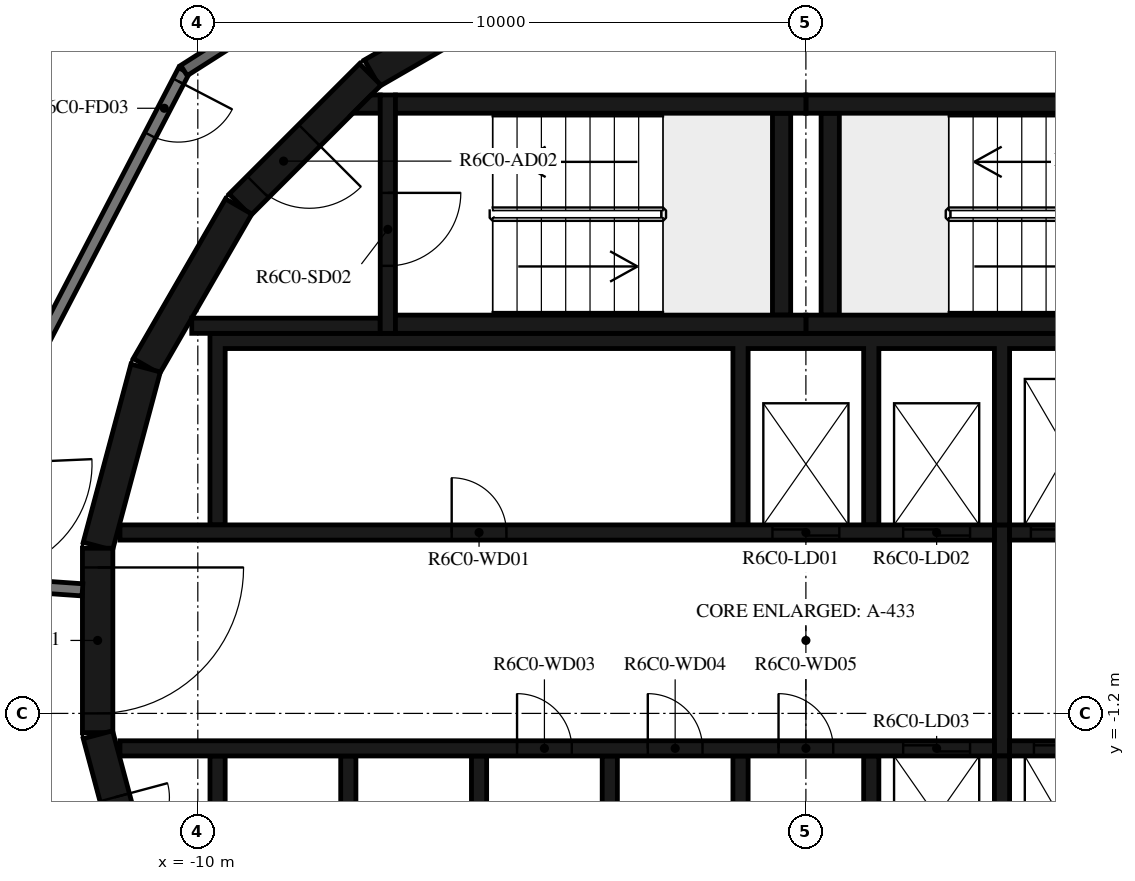
"""IFC4 building model, lengths in metres.
Left out: names, types, materials, properties, quantities, classifications, styles, units other than length and angle.
Written with IfcOpenShell. Run it as: python <this file> out.ifc"""

import sys

from ifc_helpers import new_model, si_unit, direction, frame, frame_2d, origin, place, context, subcontext, project, spatial, polyline, rectangle, outline, extrude, element, fill, save


model = new_model("IFC4")
c1 = context("Model", 3, precision=1e-05, world=origin(), true_north=direction((0.0, 1.0)))
c2 = subcontext(c1, "Body", "Model", "MODEL_VIEW")
j1 = project(units=[si_unit("LENGTHUNIT", "METRE"), si_unit("PLANEANGLEUNIT", "RADIAN")], contexts=[c1])
p1 = place(None, origin())
s1 = spatial("IfcSite", under=j1, at=p1, CompositionType="ELEMENT")
p2 = place(p1, origin())
s2 = spatial("IfcBuilding", under=s1, at=p2, CompositionType="ELEMENT")
p3 = place(p2, frame((0.0, 0.0, 247.7)))
s3 = spatial("IfcBuildingStorey", under=s2, at=p3, CompositionType="ELEMENT", Elevation=247.7)
p4 = place(p3, frame((-4.51, 10.845, 0.0), z_axis=(0.0, 0.0, 1.0), x_axis=(-0.865975092491, -0.500087131594, 0.0)))
e1 = element("IfcWall", 1, at=p4, inside=s3, PredefinedType="SHEAR", context=c2, shape_type="SweptSolid", body=[
    extrude(rectangle(XDim=3.033, YDim=0.5, at=frame_2d((1.516, 0.0))), origin(), (0.0, 0.0, 1.0), 3.12),
])
p5 = place(p3, frame((-7.164, 9.308, 0.0), z_axis=(0.0, 0.0, 1.0), x_axis=(-0.707106781187, -0.707106781187, 0.0)))
e2 = element("IfcWall", 2, at=p5, inside=s3, PredefinedType="SHEAR", context=c2, shape_type="SweptSolid", body=[
    extrude(rectangle(XDim=3.032, YDim=0.5, at=frame_2d((1.516, 0.0))), origin(), (0.0, 0.0, 1.0), 3.12),
])
p6 = place(p5, frame((1.416, 0.0, 0.0)))
e3 = element("IfcOpeningElement", 3, at=p6, cuts=e2, PredefinedType="OPENING", context=c2, shape_type="SweptSolid", body=[
    extrude(rectangle(XDim=1.2, YDim=2.1, at=frame_2d((0.6, 1.05))), frame((0.0, 0.26, 0.0), z_axis=(0.0, -1.0, 0.0), x_axis=(1.0, 0.0, 0.0)), (0.0, 0.0, 1.0), 0.52),
])
for number, where, z_axis, x_axis in (
    (4, (-9.329, 7.137, 0.0), (0.0, 0.0, 1.0), (-0.5, -0.866, 0.0)),
    (5, (-10.858, 4.479, 0.0), (0.0, 0.0, 1.0), (-0.259, -0.966, 0.0)),
):
    element("IfcWall", number, at=place(p3, frame(where, z_axis=z_axis, x_axis=x_axis)), inside=s3, PredefinedType="SHEAR", context=c2, shape_type="SweptSolid", body=[
        extrude(rectangle(XDim=3.033, YDim=0.5, at=frame_2d((1.516, 0.0))), origin(), (0.0, 0.0, 1.0), 3.12),
    ])
p7 = place(p3, frame((-11.647, 1.516, 0.0), z_axis=(0.0, 0.0, 1.0), x_axis=(0.0, -1.0, 0.0)))
e6 = element("IfcWall", 6, at=p7, inside=s3, PredefinedType="SHEAR", context=c2, shape_type="SweptSolid", body=[
    extrude(rectangle(XDim=3.033, YDim=0.5, at=frame_2d((1.516, 0.0))), origin(), (0.0, 0.0, 1.0), 3.12),
])
p8 = place(p7, frame((0.316, 0.0, 0.0)))
e7 = element("IfcOpeningElement", 7, at=p8, cuts=e6, PredefinedType="OPENING", context=c2, shape_type="SweptSolid", body=[
    extrude(rectangle(XDim=2.4, YDim=2.1, at=frame_2d((1.2, 1.05))), frame((0.0, 0.26, 0.0), z_axis=(0.0, -1.0, 0.0), x_axis=(1.0, 0.0, 0.0)), (0.0, 0.0, 1.0), 0.52),
])
p9 = place(p3, frame((-11.643, -1.55, 0.0), z_axis=(0.0, 0.0, 1.0), x_axis=(0.258734743916, -0.965948410781, 0.0)))
e8 = element("IfcWall", 8, at=p9, inside=s3, PredefinedType="SHEAR", context=c2, shape_type="SweptSolid", body=[
    extrude(rectangle(XDim=3.033, YDim=0.5, at=frame_2d((1.516, 0.0))), origin(), (0.0, 0.0, 1.0), 3.12),
])
p10 = place(p9, frame((1.066, 0.0, 0.0)))
e9 = element("IfcOpeningElement", 9, at=p10, cuts=e8, PredefinedType="OPENING", context=c2, shape_type="SweptSolid", body=[
    extrude(rectangle(XDim=0.9, YDim=2.1, at=frame_2d((0.45, 1.05))), frame((0.0, 0.26, 0.0), z_axis=(0.0, -1.0, 0.0), x_axis=(1.0, 0.0, 0.0)), (0.0, 0.0, 1.0), 0.52),
])
for number, where, z_axis, x_axis in (
    (10, (0.0, 5.2, 0.0), (0.0, 0.0, 1.0), (1.0, 0.0, 0.0)),
    (11, (0.0, 8.82, 0.0), (0.0, 0.0, 1.0), (1.0, 0.0, 0.0)),
):
    element("IfcWall", number, at=place(p3, frame(where, z_axis=z_axis, x_axis=x_axis)), inside=s3, PredefinedType="SHEAR", context=c2, shape_type="SweptSolid", body=[
        extrude(rectangle(XDim=6.75, YDim=0.3, at=frame_2d((3.375, 0.0))), origin(), (0.0, 0.0, 1.0), 3.12),
    ])
p11 = place(p3, frame((0.4, 5.35, 0.0), z_axis=(0.0, 0.0, 1.0), x_axis=(0.0, 1.0, 0.0)))
e12 = element("IfcWall", 12, at=p11, inside=s3, PredefinedType="SHEAR", context=c2, shape_type="SweptSolid", body=[
    extrude(rectangle(XDim=3.32, YDim=0.3, at=frame_2d((1.66, 0.0))), origin(), (0.0, 0.0, 1.0), 3.12),
])
for number, where, z_axis, x_axis in (
    (13, (-6.75, 5.2, 0.0), (0.0, 0.0, 1.0), (1.0, 0.0, 0.0)),
    (14, (-6.75, 8.82, 0.0), (0.0, 0.0, 1.0), (1.0, 0.0, 0.0)),
):
    element("IfcWall", number, at=place(p3, frame(where, z_axis=z_axis, x_axis=x_axis)), inside=s3, PredefinedType="SHEAR", context=c2, shape_type="SweptSolid", body=[
        extrude(rectangle(XDim=6.75, YDim=0.3, at=frame_2d((3.375, 0.0))), origin(), (0.0, 0.0, 1.0), 3.12),
    ])
p12 = place(p3, frame((-0.4, 5.35, 0.0), z_axis=(0.0, 0.0, 1.0), x_axis=(0.0, 1.0, 0.0)))
e15 = element("IfcWall", 15, at=p12, inside=s3, PredefinedType="SHEAR", context=c2, shape_type="SweptSolid", body=[
    extrude(rectangle(XDim=3.32, YDim=0.3, at=frame_2d((1.66, 0.0))), origin(), (0.0, 0.0, 1.0), 3.12),
])
p13 = place(p3, frame((-6.875, 8.97, 0.0), z_axis=(0.0, 0.0, 1.0), x_axis=(0.0, -1.0, 0.0)))
e16 = element("IfcWall", 16, at=p13, inside=s3, PredefinedType="SHEAR", context=c2, shape_type="SweptSolid", body=[
    extrude(rectangle(XDim=3.92, YDim=0.25, at=frame_2d((1.96, 0.0))), origin(), (0.0, 0.0, 1.0), 3.12),
])
p14 = place(p13, frame((1.61, 0.0, 0.0)))
e17 = element("IfcOpeningElement", 17, at=p14, cuts=e16, PredefinedType="OPENING", context=c2, shape_type="SweptSolid", body=[
    extrude(rectangle(XDim=1.2, YDim=2.1, at=frame_2d((0.6, 1.05))), frame((0.0, 0.135, 0.0), z_axis=(0.0, -1.0, 0.0), x_axis=(1.0, 0.0, 0.0)), (0.0, 0.0, 1.0), 0.27),
])
p15 = place(p3, frame((-7.0, 5.175, 0.0), z_axis=(0.0, 0.0, 1.0), x_axis=(-1.0, 0.0, 0.0)))
e18 = element("IfcWall", 18, at=p15, inside=s3, PredefinedType="SHEAR", context=c2, shape_type="SweptSolid", body=[
    extrude(rectangle(XDim=3.1, YDim=0.25, at=frame_2d((1.55, 0.0))), origin(), (0.0, 0.0, 1.0), 3.12),
])
p16 = place(p3, origin())
e19 = element("IfcWall", 19, at=p16, inside=s3, PredefinedType="SHEAR", context=c2, shape_type="SweptSolid", body=[
    extrude(outline(polyline([(-7.148, 8.97), (-7.0, 8.97), (-7.0, 8.67), (-7.448, 8.67), (-7.148, 8.97)])), origin(), (0.0, 0.0, 1.0), 3.12),
])
p17 = place(p3, origin())
e20 = element("IfcWall", 20, at=p17, inside=s3, PredefinedType="SHEAR", context=c2, shape_type="SweptSolid", body=[
    extrude(outline(polyline([(-9.55, 4.8), (-1.2, 4.8), (-1.2, 1.9), (-0.95, 1.9), (-0.95, 4.8), (0.95, 4.8), (0.95, 1.9), (1.2, 1.9), (1.2, 4.8), (3.1, 4.8), (3.1, 1.9), (3.35, 1.9), (3.35, 4.8), (5.25, 4.8), (5.25, 1.9), (5.5, 1.9), (5.5, 4.8), (7.4, 4.8), (7.4, 1.9), (7.65, 1.9), (7.65, 4.8), (9.55, 4.8), (9.55, 1.9), (9.8, 1.9), (9.8, 4.8), (9.8, 5.05), (-9.8, 5.05), (-9.8, 4.8), (-9.8, 1.9), (-9.55, 1.9), (-9.55, 4.8)])), origin(), (0.0, 0.0, 1.0), 3.12),
])
p18 = place(p3, origin())
e21 = element("IfcWall", 21, at=p18, inside=s3, PredefinedType="SHEAR", context=c2, shape_type="SweptSolid", body=[
    extrude(outline(polyline([(9.8, -5.05), (9.8, -4.8), (9.8, -1.9), (9.55, -1.9), (9.55, -4.8), (7.65, -4.8), (7.65, -1.9), (7.4, -1.9), (7.4, -4.8), (5.5, -4.8), (5.5, -1.9), (5.25, -1.9), (5.25, -4.8), (3.35, -4.8), (3.35, -1.9), (3.1, -1.9), (3.1, -4.8), (1.2, -4.8), (1.2, -1.9), (0.95, -1.9), (0.95, -4.8), (-0.95, -4.8), (-0.95, -1.9), (-1.2, -1.9), (-1.2, -4.8), (-3.1, -4.8), (-3.1, -1.9), (-3.35, -1.9), (-3.35, -4.8), (-5.25, -4.8), (-5.25, -1.9), (-5.5, -1.9), (-5.5, -4.8), (-7.4, -4.8), (-7.4, -1.9), (-7.65, -1.9), (-7.65, -4.8), (-9.55, -4.8), (-9.55, -1.9), (-9.8, -1.9), (-9.8, -4.8), (-9.8, -5.05), (9.8, -5.05)])), origin(), (0.0, 0.0, 1.0), 3.12),
])
p19 = place(p3, frame((-11.28, 1.775, 0.0), z_axis=(0.0, 0.0, 1.0), x_axis=(1.0, 0.0, 0.0)))
e22 = element("IfcWall", 22, at=p19, inside=s3, PredefinedType="SHEAR", context=c2, shape_type="SweptSolid", body=[
    extrude(rectangle(XDim=14.38, YDim=0.25, at=frame_2d((7.19, 0.0))), origin(), (0.0, 0.0, 1.0), 3.12),
])
p20 = place(p19, frame((10.73, 0.0, 0.0)))
e23 = element("IfcOpeningElement", 23, at=p20, cuts=e22, PredefinedType="OPENING", context=c2, shape_type="SweptSolid", body=[
    extrude(rectangle(XDim=1.1, YDim=2.1, at=frame_2d((0.55, 1.05))), frame((0.0, 0.135, 0.0), z_axis=(0.0, -1.0, 0.0), x_axis=(1.0, 0.0, 0.0)), (0.0, 0.0, 1.0), 0.27),
])
p21 = place(p19, frame((12.88, 0.0, 0.0)))
e24 = element("IfcOpeningElement", 24, at=p21, cuts=e22, PredefinedType="OPENING", context=c2, shape_type="SweptSolid", body=[
    extrude(rectangle(XDim=1.1, YDim=2.1, at=frame_2d((0.55, 1.05))), frame((0.0, 0.135, 0.0), z_axis=(0.0, -1.0, 0.0), x_axis=(1.0, 0.0, 0.0)), (0.0, 0.0, 1.0), 0.27),
])
p22 = place(p19, frame((5.455, 0.0, 0.0)))
e25 = element("IfcOpeningElement", 25, at=p22, cuts=e22, PredefinedType="OPENING", context=c2, shape_type="SweptSolid", body=[
    extrude(rectangle(XDim=0.9, YDim=2.1, at=frame_2d((0.45, 1.05))), frame((0.0, 0.135, 0.0), z_axis=(0.0, -1.0, 0.0), x_axis=(1.0, 0.0, 0.0)), (0.0, 0.0, 1.0), 0.27),
])
p23 = place(p3, frame((3.35, 1.775, 0.0), z_axis=(0.0, 0.0, 1.0), x_axis=(1.0, 0.0, 0.0)))
e26 = element("IfcWall", 26, at=p23, inside=s3, PredefinedType="SHEAR", context=c2, shape_type="SweptSolid", body=[
    extrude(rectangle(XDim=7.93, YDim=0.25, at=frame_2d((3.965, 0.0))), origin(), (0.0, 0.0, 1.0), 3.12),
])
p24 = place(p23, frame((0.35, 0.0, 0.0)))
e27 = element("IfcOpeningElement", 27, at=p24, cuts=e26, PredefinedType="OPENING", context=c2, shape_type="SweptSolid", body=[
    extrude(rectangle(XDim=1.2, YDim=2.4, at=frame_2d((0.6, 1.2))), frame((0.0, 0.135, 0.0), z_axis=(0.0, -1.0, 0.0), x_axis=(1.0, 0.0, 0.0)), (0.0, 0.0, 1.0), 0.27),
])
p25 = place(p23, frame((2.5, 0.0, 0.0)))
e28 = element("IfcOpeningElement", 28, at=p25, cuts=e26, PredefinedType="OPENING", context=c2, shape_type="SweptSolid", body=[
    extrude(rectangle(XDim=1.2, YDim=2.4, at=frame_2d((0.6, 1.2))), frame((0.0, 0.135, 0.0), z_axis=(0.0, -1.0, 0.0), x_axis=(1.0, 0.0, 0.0)), (0.0, 0.0, 1.0), 0.27),
])
p26 = place(p23, frame((4.8, 0.0, 0.0)))
e29 = element("IfcOpeningElement", 29, at=p26, cuts=e26, PredefinedType="OPENING", context=c2, shape_type="SweptSolid", body=[
    extrude(rectangle(XDim=0.9, YDim=2.1, at=frame_2d((0.45, 1.05))), frame((0.0, 0.135, 0.0), z_axis=(0.0, -1.0, 0.0), x_axis=(1.0, 0.0, 0.0)), (0.0, 0.0, 1.0), 0.27),
])
p27 = place(p3, frame((-11.28, -1.775, 0.0), z_axis=(0.0, 0.0, 1.0), x_axis=(1.0, 0.0, 0.0)))
e30 = element("IfcWall", 30, at=p27, inside=s3, PredefinedType="SHEAR", context=c2, shape_type="SweptSolid", body=[
    extrude(rectangle(XDim=14.38, YDim=0.25, at=frame_2d((7.19, 0.0))), origin(), (0.0, 0.0, 1.0), 3.12),
])
p28 = place(p27, frame((12.88, 0.0, 0.0)))
e31 = element("IfcOpeningElement", 31, at=p28, cuts=e30, PredefinedType="OPENING", context=c2, shape_type="SweptSolid", body=[
    extrude(rectangle(XDim=1.1, YDim=2.1, at=frame_2d((0.55, 1.05))), frame((0.0, 0.135, 0.0), z_axis=(0.0, -1.0, 0.0), x_axis=(1.0, 0.0, 0.0)), (0.0, 0.0, 1.0), 0.27),
])
p29 = place(p27, frame((6.53, 0.0, 0.0)))
e32 = element("IfcOpeningElement", 32, at=p29, cuts=e30, PredefinedType="OPENING", context=c2, shape_type="SweptSolid", body=[
    extrude(rectangle(XDim=0.9, YDim=2.1, at=frame_2d((0.45, 1.05))), frame((0.0, 0.135, 0.0), z_axis=(0.0, -1.0, 0.0), x_axis=(1.0, 0.0, 0.0)), (0.0, 0.0, 1.0), 0.27),
])
p30 = place(p27, frame((8.68, 0.0, 0.0)))
e33 = element("IfcOpeningElement", 33, at=p30, cuts=e30, PredefinedType="OPENING", context=c2, shape_type="SweptSolid", body=[
    extrude(rectangle(XDim=0.9, YDim=2.1, at=frame_2d((0.45, 1.05))), frame((0.0, 0.135, 0.0), z_axis=(0.0, -1.0, 0.0), x_axis=(1.0, 0.0, 0.0)), (0.0, 0.0, 1.0), 0.27),
])
p31 = place(p27, frame((10.83, 0.0, 0.0)))
e34 = element("IfcOpeningElement", 34, at=p31, cuts=e30, PredefinedType="OPENING", context=c2, shape_type="SweptSolid", body=[
    extrude(rectangle(XDim=0.9, YDim=2.1, at=frame_2d((0.45, 1.05))), frame((0.0, 0.135, 0.0), z_axis=(0.0, -1.0, 0.0), x_axis=(1.0, 0.0, 0.0)), (0.0, 0.0, 1.0), 0.27),
])
p32 = place(p3, frame((3.35, -1.775, 0.0), z_axis=(0.0, 0.0, 1.0), x_axis=(1.0, 0.0, 0.0)))
e35 = element("IfcWall", 35, at=p32, inside=s3, PredefinedType="SHEAR", context=c2, shape_type="SweptSolid", body=[
    extrude(rectangle(XDim=7.93, YDim=0.25, at=frame_2d((3.965, 0.0))), origin(), (0.0, 0.0, 1.0), 3.12),
])
p33 = place(p32, frame((0.4, 0.0, 0.0)))
e36 = element("IfcOpeningElement", 36, at=p33, cuts=e35, PredefinedType="OPENING", context=c2, shape_type="SweptSolid", body=[
    extrude(rectangle(XDim=1.1, YDim=2.4, at=frame_2d((0.55, 1.2))), frame((0.0, 0.135, 0.0), z_axis=(0.0, -1.0, 0.0), x_axis=(1.0, 0.0, 0.0)), (0.0, 0.0, 1.0), 0.27),
])
p34 = place(p32, frame((2.55, 0.0, 0.0)))
e37 = element("IfcOpeningElement", 37, at=p34, cuts=e35, PredefinedType="OPENING", context=c2, shape_type="SweptSolid", body=[
    extrude(rectangle(XDim=1.1, YDim=2.4, at=frame_2d((0.55, 1.2))), frame((0.0, 0.135, 0.0), z_axis=(0.0, -1.0, 0.0), x_axis=(1.0, 0.0, 0.0)), (0.0, 0.0, 1.0), 0.27),
])
p35 = place(p32, frame((4.7, 0.0, 0.0)))
e38 = element("IfcOpeningElement", 38, at=p35, cuts=e35, PredefinedType="OPENING", context=c2, shape_type="SweptSolid", body=[
    extrude(rectangle(XDim=1.1, YDim=2.4, at=frame_2d((0.55, 1.2))), frame((0.0, 0.135, 0.0), z_axis=(0.0, -1.0, 0.0), x_axis=(1.0, 0.0, 0.0)), (0.0, 0.0, 1.0), 0.27),
])
p36 = place(p3, frame((3.225, -1.9, 0.0), z_axis=(0.0, 0.0, 1.0), x_axis=(0.0, 1.0, 0.0)))
e39 = element("IfcWall", 39, at=p36, inside=s3, PredefinedType="SHEAR", context=c2, shape_type="SweptSolid", body=[
    extrude(rectangle(XDim=3.8, YDim=0.25, at=frame_2d((1.9, 0.0))), origin(), (0.0, 0.0, 1.0), 3.12),
])
p37 = place(p3, frame((-10.228, 9.372, 0.0), z_axis=(0.0, 0.0, 1.0), x_axis=(-0.461759464021, -0.887005184532, 0.0)))
e40 = element("IfcWall", 40, at=p37, inside=s3, PredefinedType="STANDARD", context=c2, shape_type="SweptSolid", body=[
    extrude(rectangle(XDim=7.181, YDim=0.2, at=frame_2d((3.591, 0.0))), origin(), (0.0, 0.0, 1.0), 3.12),
])
p38 = place(p37, frame((0.2, 0.0, 0.0)))
e41 = element("IfcOpeningElement", 41, at=p38, cuts=e40, PredefinedType="OPENING", context=c2, shape_type="SweptSolid", body=[
    extrude(rectangle(XDim=1.0, YDim=2.1, at=frame_2d((0.5, 1.05))), frame((0.0, 0.11, 0.0), z_axis=(0.0, -1.0, 0.0), x_axis=(1.0, 0.0, 0.0)), (0.0, 0.0, 1.0), 0.22),
])
p39 = place(p3, frame((-13.454, 0.941, 0.0), z_axis=(0.0, 0.0, 1.0), x_axis=(0.99755155062, -0.069934997354, 0.0)))
e42 = element("IfcWall", 42, at=p39, inside=s3, PredefinedType="STANDARD", context=c2, shape_type="SweptSolid", body=[
    extrude(rectangle(XDim=1.561, YDim=0.2, at=frame_2d((0.78, 0.0))), origin(), (0.0, 0.0, 1.0), 3.12),
])
p40 = place(p3, frame((-4.172, 13.231, 0.0), z_axis=(0.0, 0.0, 1.0), x_axis=(-0.843388394728, -0.537304397561, 0.0)))
e43 = element("IfcWall", 43, at=p40, inside=s3, PredefinedType="STANDARD", context=c2, shape_type="SweptSolid", body=[
    extrude(rectangle(XDim=7.181, YDim=0.2, at=frame_2d((3.59, 0.0))), origin(), (0.0, 0.0, 1.0), 3.12),
])
p41 = place(p14, origin())
e44 = element("IfcDoor", 44, at=p41, inside=s3, OperationType="SINGLE_SWING_LEFT", PredefinedType="DOOR", context=c2, shape_type="SweptSolid", body=[
    extrude(rectangle(XDim=1.2, YDim=2.1, at=frame_2d((0.6, 1.05))), frame((0.0, 0.025, 0.0), z_axis=(0.0, -1.0, 0.0), x_axis=(1.0, 0.0, 0.0)), (0.0, 0.0, 1.0), 0.05),
])
fill(e17, e44)
p42 = place(p6, origin())
e45 = element("IfcDoor", 45, at=p42, inside=s3, OperationType="SINGLE_SWING_RIGHT", PredefinedType="DOOR", context=c2, shape_type="SweptSolid", body=[
    extrude(rectangle(XDim=1.2, YDim=2.1, at=frame_2d((0.6, 1.05))), frame((0.0, 0.025, 0.0), z_axis=(0.0, -1.0, 0.0), x_axis=(1.0, 0.0, 0.0)), (0.0, 0.0, 1.0), 0.05),
])
fill(e3, e45)
p43 = place(p8, origin())
e46 = element("IfcDoor", 46, at=p43, inside=s3, OperationType="DOUBLE_DOOR_SINGLE_SWING", PredefinedType="DOOR", context=c2, shape_type="SweptSolid", body=[
    extrude(rectangle(XDim=2.4, YDim=2.1, at=frame_2d((1.2, 1.05))), frame((0.0, 0.025, 0.0), z_axis=(0.0, -1.0, 0.0), x_axis=(1.0, 0.0, 0.0)), (0.0, 0.0, 1.0), 0.05),
])
fill(e7, e46)
p44 = place(p20, origin())
e47 = element("IfcDoor", 47, at=p44, inside=s3, OperationType="DOUBLE_DOOR_SLIDING", PredefinedType="DOOR", context=c2, shape_type="SweptSolid", body=[
    extrude(rectangle(XDim=1.1, YDim=2.1, at=frame_2d((0.55, 1.05))), frame((0.0, 0.025, 0.0), z_axis=(0.0, -1.0, 0.0), x_axis=(1.0, 0.0, 0.0)), (0.0, 0.0, 1.0), 0.05),
])
fill(e23, e47)
p45 = place(p21, origin())
e48 = element("IfcDoor", 48, at=p45, inside=s3, OperationType="DOUBLE_DOOR_SLIDING", PredefinedType="DOOR", context=c2, shape_type="SweptSolid", body=[
    extrude(rectangle(XDim=1.1, YDim=2.1, at=frame_2d((0.55, 1.05))), frame((0.0, 0.025, 0.0), z_axis=(0.0, -1.0, 0.0), x_axis=(1.0, 0.0, 0.0)), (0.0, 0.0, 1.0), 0.05),
])
fill(e24, e48)
p46 = place(p24, origin())
e49 = element("IfcDoor", 49, at=p46, inside=s3, OperationType="DOUBLE_DOOR_SLIDING", PredefinedType="DOOR", context=c2, shape_type="SweptSolid", body=[
    extrude(rectangle(XDim=1.2, YDim=2.4, at=frame_2d((0.6, 1.2))), frame((0.0, 0.025, 0.0), z_axis=(0.0, -1.0, 0.0), x_axis=(1.0, 0.0, 0.0)), (0.0, 0.0, 1.0), 0.05),
])
fill(e27, e49)
p47 = place(p28, origin())
e50 = element("IfcDoor", 50, at=p47, inside=s3, OperationType="DOUBLE_DOOR_SLIDING", PredefinedType="DOOR", context=c2, shape_type="SweptSolid", body=[
    extrude(rectangle(XDim=1.1, YDim=2.1, at=frame_2d((0.55, 1.05))), frame((0.0, 0.025, 0.0), z_axis=(0.0, -1.0, 0.0), x_axis=(1.0, 0.0, 0.0)), (0.0, 0.0, 1.0), 0.05),
])
fill(e31, e50)
p48 = place(p33, origin())
e51 = element("IfcDoor", 51, at=p48, inside=s3, OperationType="DOUBLE_DOOR_SLIDING", PredefinedType="DOOR", context=c2, shape_type="SweptSolid", body=[
    extrude(rectangle(XDim=1.1, YDim=2.4, at=frame_2d((0.55, 1.2))), frame((0.0, 0.025, 0.0), z_axis=(0.0, -1.0, 0.0), x_axis=(1.0, 0.0, 0.0)), (0.0, 0.0, 1.0), 0.05),
])
fill(e36, e51)
p49 = place(p22, origin())
e52 = element("IfcDoor", 52, at=p49, inside=s3, OperationType="SINGLE_SWING_LEFT", PredefinedType="DOOR", context=c2, shape_type="SweptSolid", body=[
    extrude(rectangle(XDim=0.9, YDim=2.1, at=frame_2d((0.45, 1.05))), frame((0.0, 0.025, 0.0), z_axis=(0.0, -1.0, 0.0), x_axis=(1.0, 0.0, 0.0)), (0.0, 0.0, 1.0), 0.05),
])
fill(e25, e52)
p50 = place(p29, origin())
e53 = element("IfcDoor", 53, at=p50, inside=s3, OperationType="SINGLE_SWING_LEFT", PredefinedType="DOOR", context=c2, shape_type="SweptSolid", body=[
    extrude(rectangle(XDim=0.9, YDim=2.1, at=frame_2d((0.45, 1.05))), frame((0.0, 0.025, 0.0), z_axis=(0.0, -1.0, 0.0), x_axis=(1.0, 0.0, 0.0)), (0.0, 0.0, 1.0), 0.05),
])
fill(e32, e53)
p51 = place(p30, origin())
e54 = element("IfcDoor", 54, at=p51, inside=s3, OperationType="SINGLE_SWING_RIGHT", PredefinedType="DOOR", context=c2, shape_type="SweptSolid", body=[
    extrude(rectangle(XDim=0.9, YDim=2.1, at=frame_2d((0.45, 1.05))), frame((0.0, 0.025, 0.0), z_axis=(0.0, -1.0, 0.0), x_axis=(1.0, 0.0, 0.0)), (0.0, 0.0, 1.0), 0.05),
])
fill(e33, e54)
p52 = place(p31, origin())
e55 = element("IfcDoor", 55, at=p52, inside=s3, OperationType="SINGLE_SWING_LEFT", PredefinedType="DOOR", context=c2, shape_type="SweptSolid", body=[
    extrude(rectangle(XDim=0.9, YDim=2.1, at=frame_2d((0.45, 1.05))), frame((0.0, 0.025, 0.0), z_axis=(0.0, -1.0, 0.0), x_axis=(1.0, 0.0, 0.0)), (0.0, 0.0, 1.0), 0.05),
])
fill(e34, e55)
p53 = place(p10, origin())
e56 = element("IfcDoor", 56, at=p53, inside=s3, OperationType="SINGLE_SWING_RIGHT", PredefinedType="DOOR", context=c2, shape_type="SweptSolid", body=[
    extrude(rectangle(XDim=0.9, YDim=2.1, at=frame_2d((0.45, 1.05))), frame((0.0, 0.025, 0.0), z_axis=(0.0, -1.0, 0.0), x_axis=(1.0, 0.0, 0.0)), (0.0, 0.0, 1.0), 0.05),
])
fill(e9, e56)
p54 = place(p38, origin())
e57 = element("IfcDoor", 57, at=p54, inside=s3, OperationType="SINGLE_SWING_LEFT", PredefinedType="DOOR", context=c2, shape_type="SweptSolid", body=[
    extrude(rectangle(XDim=1.0, YDim=2.1, at=frame_2d((0.5, 1.05))), frame((0.0, 0.025, 0.0), z_axis=(0.0, -1.0, 0.0), x_axis=(1.0, 0.0, 0.0)), (0.0, 0.0, 1.0), 0.05),
])
fill(e41, e57)
save(model, sys.argv[1])
